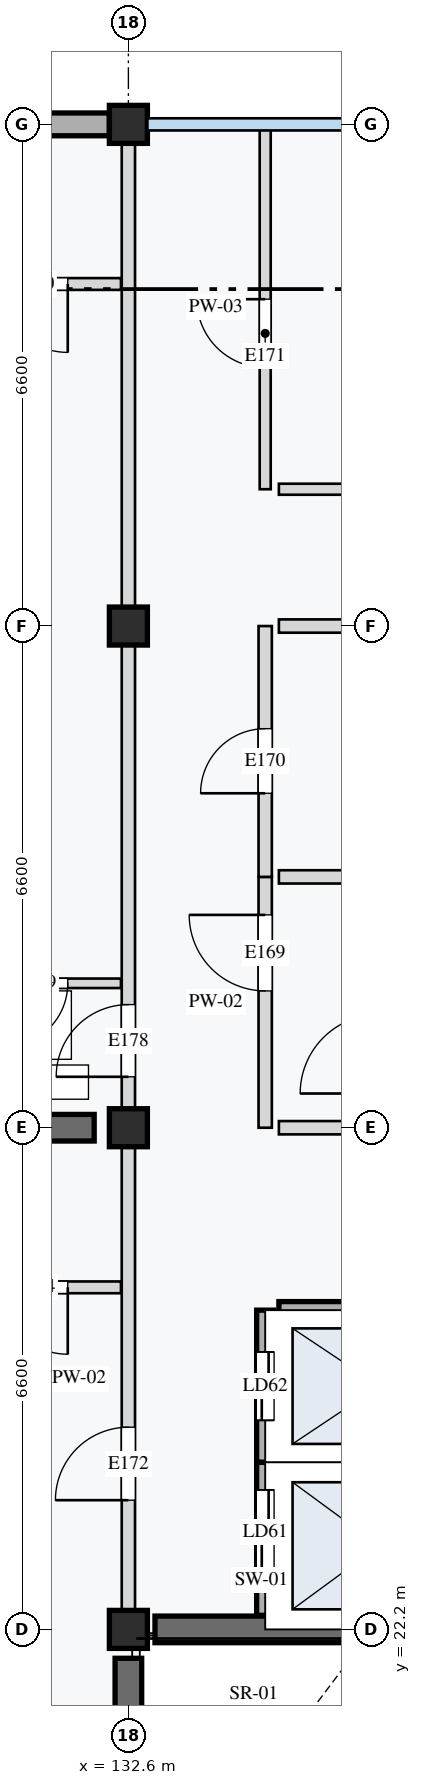
"""IFC4 building model, lengths in metres.
Left out: names, types, materials, properties, quantities, classifications, styles, units other than length and angle.
Written with IfcOpenShell. Run it as: python <this file> out.ifc"""

import sys

from ifc_helpers import new_model, si_unit, direction, frame, frame_2d, origin, origin_2d, place, context, subcontext, project, spatial, rectangle, extrude, element, fill, save


model = new_model("IFC4")
c1 = context("Model", 3, precision=1e-05, world=origin(), true_north=direction((0.0, 1.0)))
c2 = subcontext(c1, "Body", "Model", "MODEL_VIEW")
j1 = project(units=[si_unit("LENGTHUNIT", "METRE"), si_unit("PLANEANGLEUNIT", "RADIAN")], contexts=[c1])
p1 = place(None, origin())
s1 = spatial("IfcSite", under=j1, at=p1, CompositionType="ELEMENT")
p2 = place(p1, origin())
s2 = spatial("IfcBuilding", under=s1, at=p2, CompositionType="ELEMENT")
p3 = place(p2, frame((0.0, 0.0, 11.6)))
s3 = spatial("IfcBuildingStorey", under=s2, at=p3, CompositionType="ELEMENT", Elevation=11.6)
for number, where, z_axis, x_axis in (
    (1, (132.6, 22.2, 0.0), (0.0, 0.0, 1.0), (1.0, 0.0, 0.0)),
    (2, (132.6, 28.8, 0.0), (0.0, 0.0, 1.0), (1.0, 0.0, 0.0)),
    (3, (132.6, 35.4, 0.0), (0.0, 0.0, 1.0), (1.0, 0.0, 0.0)),
    (4, (132.6, 42.0, 0.0), (0.0, 0.0, 1.0), (1.0, 0.0, 0.0)),
):
    element("IfcColumn", number, at=place(p3, frame(where, z_axis=z_axis, x_axis=x_axis)), inside=s3, PredefinedType="COLUMN", context=c2, shape_type="SweptSolid", body=[
        extrude(rectangle(XDim=0.5, YDim=0.5, at=origin_2d()), origin(), (0.0, 0.0, 1.0), 3.2),
    ])
p4 = place(p3, frame((132.6, 15.98, 0.0), z_axis=(0.0, 0.0, 1.0), x_axis=(0.0, 1.0, 0.0)))
e5 = element("IfcWall", 5, at=p4, inside=s3, PredefinedType="SHEAR", context=c2, shape_type="SweptSolid", body=[
    extrude(rectangle(XDim=5.84, YDim=0.35, at=frame_2d((2.92, 0.0))), origin(), (0.0, 0.0, 1.0), 2.96),
])
p5 = place(p3, frame((132.95, 22.2, 0.0), z_axis=(0.0, 0.0, 1.0), x_axis=(1.0, 0.0, 0.0)))
e6 = element("IfcWall", 6, at=p5, inside=s3, PredefinedType="SHEAR", context=c2, shape_type="SweptSolid", body=[
    extrude(rectangle(XDim=2.8, YDim=0.35, at=frame_2d((1.4, 0.0))), origin(), (0.0, 0.0, 1.0), 2.96),
])
p6 = place(p3, frame((126.45, 28.8, 0.0), z_axis=(0.0, 0.0, 1.0), x_axis=(1.0, 0.0, 0.0)))
e7 = element("IfcWall", 7, at=p6, inside=s3, PredefinedType="SHEAR", context=c2, shape_type="SweptSolid", body=[
    extrude(rectangle(XDim=5.7, YDim=0.35, at=frame_2d((2.85, 0.0))), origin(), (0.0, 0.0, 1.0), 2.96),
])
p7 = place(p3, frame((126.25, 42.0, 0.0), z_axis=(0.0, 0.0, 1.0), x_axis=(1.0, 0.0, 0.0)))
e8 = element("IfcWall", 8, at=p7, inside=s3, PredefinedType="STANDARD", context=c2, shape_type="SweptSolid", body=[
    extrude(rectangle(XDim=6.1, YDim=0.3, at=frame_2d((3.05, 0.0))), origin(), (0.0, 0.0, 1.0), 2.65),
])
p8 = place(p3, frame((134.4, 22.385, 0.0), z_axis=(0.0, 0.0, 1.0), x_axis=(0.0, 1.0, 0.0)))
e9 = element("IfcWall", 9, at=p8, inside=s3, PredefinedType="STANDARD", context=c2, shape_type="SweptSolid", body=[
    extrude(rectangle(XDim=2.015, YDim=0.225, at=frame_2d((1.007, 0.0))), origin(), (0.0, 0.0, 1.0), 2.96),
])
p9 = place(p8, frame((0.55, 0.0, 0.0)))
e10 = element("IfcOpeningElement", 10, at=p9, cuts=e9, PredefinedType="OPENING", context=c2, shape_type="SweptSolid", body=[
    extrude(rectangle(XDim=1.1, YDim=2.1, at=frame_2d((0.55, 1.05))), frame((0.0, 0.123, 0.0), z_axis=(0.0, -1.0, 0.0), x_axis=(1.0, 0.0, 0.0)), (0.0, 0.0, 1.0), 0.245),
])
p10 = place(p3, frame((134.4, 24.4, 0.0), z_axis=(0.0, 0.0, 1.0), x_axis=(0.0, 1.0, 0.0)))
e11 = element("IfcWall", 11, at=p10, inside=s3, PredefinedType="STANDARD", context=c2, shape_type="SweptSolid", body=[
    extrude(rectangle(XDim=2.0, YDim=0.225, at=frame_2d((1.0, 0.0))), origin(), (0.0, 0.0, 1.0), 2.96),
])
p11 = place(p10, frame((0.55, 0.0, 0.0)))
e12 = element("IfcOpeningElement", 12, at=p11, cuts=e11, PredefinedType="OPENING", context=c2, shape_type="SweptSolid", body=[
    extrude(rectangle(XDim=0.9, YDim=2.1, at=frame_2d((0.45, 1.05))), frame((0.0, 0.123, 0.0), z_axis=(0.0, -1.0, 0.0), x_axis=(1.0, 0.0, 0.0)), (0.0, 0.0, 1.0), 0.245),
])
for number, where, z_axis, x_axis in (
    (13, (134.58, 24.4, 0.0), (0.0, 0.0, 1.0), (1.0, 0.0, 0.0)),
    (14, (134.58, 26.4, 0.0), (0.0, 0.0, 1.0), (1.0, 0.0, 0.0)),
):
    element("IfcWall", number, at=place(p3, frame(where, z_axis=z_axis, x_axis=x_axis)), inside=s3, PredefinedType="STANDARD", context=c2, shape_type="SweptSolid", body=[
        extrude(rectangle(XDim=2.64, YDim=0.225, at=frame_2d((1.32, 0.0))), origin(), (0.0, 0.0, 1.0), 2.96),
    ])
p12 = place(p3, frame((134.4, 28.8, 0.0), z_axis=(0.0, 0.0, 1.0), x_axis=(0.0, 1.0, 0.0)))
e15 = element("IfcWall", 15, at=p12, inside=s3, PredefinedType="PARTITIONING", context=c2, shape_type="SweptSolid", body=[
    extrude(rectangle(XDim=3.3, YDim=0.175, at=frame_2d((1.65, 0.0))), origin(), (0.0, 0.0, 1.0), 2.96),
])
p13 = place(p12, frame((1.8, 0.0, 0.0)))
e16 = element("IfcOpeningElement", 16, at=p13, cuts=e15, PredefinedType="OPENING", context=c2, shape_type="SweptSolid", body=[
    extrude(rectangle(XDim=1.0, YDim=2.1, at=frame_2d((0.5, 1.05))), frame((0.0, 0.097, 0.0), z_axis=(0.0, -1.0, 0.0), x_axis=(1.0, 0.0, 0.0)), (0.0, 0.0, 1.0), 0.195),
])
p14 = place(p3, frame((134.4, 32.1, 0.0), z_axis=(0.0, 0.0, 1.0), x_axis=(0.0, 1.0, 0.0)))
e17 = element("IfcWall", 17, at=p14, inside=s3, PredefinedType="PARTITIONING", context=c2, shape_type="SweptSolid", body=[
    extrude(rectangle(XDim=3.3, YDim=0.175, at=frame_2d((1.65, 0.0))), origin(), (0.0, 0.0, 1.0), 2.96),
])
p15 = place(p14, frame((1.1, 0.0, 0.0)))
e18 = element("IfcOpeningElement", 18, at=p15, cuts=e17, PredefinedType="OPENING", context=c2, shape_type="SweptSolid", body=[
    extrude(rectangle(XDim=0.85, YDim=2.0, at=frame_2d((0.425, 1.0))), frame((0.0, 0.097, 0.0), z_axis=(0.0, -1.0, 0.0), x_axis=(1.0, 0.0, 0.0)), (0.0, 0.0, 1.0), 0.195),
])
for number, where, z_axis, x_axis in (
    (19, (134.58, 28.8, 0.0), (0.0, 0.0, 1.0), (1.0, 0.0, 0.0)),
    (20, (134.58, 32.1, 0.0), (0.0, 0.0, 1.0), (1.0, 0.0, 0.0)),
    (21, (134.58, 35.4, 0.0), (0.0, 0.0, 1.0), (1.0, 0.0, 0.0)),
):
    element("IfcWall", number, at=place(p3, frame(where, z_axis=z_axis, x_axis=x_axis)), inside=s3, PredefinedType="PARTITIONING", context=c2, shape_type="SweptSolid", body=[
        extrude(rectangle(XDim=1.14, YDim=0.175, at=frame_2d((0.57, 0.0))), origin(), (0.0, 0.0, 1.0), 2.96),
    ])
p16 = place(p3, frame((134.4, 37.2, 0.0), z_axis=(0.0, 0.0, 1.0), x_axis=(0.0, 1.0, 0.0)))
e22 = element("IfcWall", 22, at=p16, inside=s3, PredefinedType="PARTITIONING", context=c2, shape_type="SweptSolid", body=[
    extrude(rectangle(XDim=4.8, YDim=0.145, at=frame_2d((2.4, 0.0))), origin(), (0.0, 0.0, 1.0), 2.96),
])
p17 = place(p16, frame((1.6, 0.0, 0.0)))
e23 = element("IfcOpeningElement", 23, at=p17, cuts=e22, PredefinedType="OPENING", context=c2, shape_type="SweptSolid", body=[
    extrude(rectangle(XDim=0.9, YDim=2.16, at=frame_2d((0.45, 1.08))), frame((0.0, 0.083, 0.0), z_axis=(0.0, -1.0, 0.0), x_axis=(1.0, 0.0, 0.0)), (0.0, 0.0, 1.0), 0.165),
])
p18 = place(p3, frame((134.58, 37.2, 0.0), z_axis=(0.0, 0.0, 1.0), x_axis=(1.0, 0.0, 0.0)))
e24 = element("IfcWall", 24, at=p18, inside=s3, PredefinedType="PARTITIONING", context=c2, shape_type="SweptSolid", body=[
    extrude(rectangle(XDim=2.64, YDim=0.145, at=frame_2d((1.32, 0.0))), origin(), (0.0, 0.0, 1.0), 2.96),
])
p19 = place(p3, frame((132.6, 22.2, 0.0), z_axis=(0.0, 0.0, 1.0), x_axis=(0.0, 1.0, 0.0)))
e25 = element("IfcWall", 25, at=p19, inside=s3, PredefinedType="PARTITIONING", context=c2, shape_type="SweptSolid", body=[
    extrude(rectangle(XDim=6.6, YDim=0.175, at=frame_2d((3.3, 0.0))), origin(), (0.0, 0.0, 1.0), 2.55),
])
p20 = place(p19, frame((1.7, 0.0, 0.0)))
e26 = element("IfcOpeningElement", 26, at=p20, cuts=e25, PredefinedType="OPENING", context=c2, shape_type="SweptSolid", body=[
    extrude(rectangle(XDim=0.96, YDim=2.18, at=frame_2d((0.48, 1.09))), frame((0.0, 0.097, 0.0), z_axis=(0.0, -1.0, 0.0), x_axis=(1.0, 0.0, 0.0)), (0.0, 0.0, 1.0), 0.195),
])
p21 = place(p3, frame((132.502, 26.7, 0.0), z_axis=(0.0, 0.0, 1.0), x_axis=(-1.0, 0.0, 0.0)))
e27 = element("IfcWall", 27, at=p21, inside=s3, PredefinedType="PARTITIONING", context=c2, shape_type="SweptSolid", body=[
    extrude(rectangle(XDim=2.302, YDim=0.155, at=frame_2d((1.151, 0.0))), origin(), (0.0, 0.0, 1.0), 2.96),
])
p22 = place(p21, frame((0.7, 0.0, 0.0)))
e28 = element("IfcOpeningElement", 28, at=p22, cuts=e27, PredefinedType="OPENING", context=c2, shape_type="SweptSolid", body=[
    extrude(rectangle(XDim=0.88, YDim=2.16, at=frame_2d((0.44, 1.08))), frame((0.0, 0.087, 0.0), z_axis=(0.0, -1.0, 0.0), x_axis=(1.0, 0.0, 0.0)), (0.0, 0.0, 1.0), 0.175),
])
p23 = place(p3, frame((132.6, 28.8, 0.0), z_axis=(0.0, 0.0, 1.0), x_axis=(0.0, 1.0, 0.0)))
e29 = element("IfcWall", 29, at=p23, inside=s3, PredefinedType="PARTITIONING", context=c2, shape_type="SweptSolid", body=[
    extrude(rectangle(XDim=13.2, YDim=0.175, at=frame_2d((6.6, 0.0))), origin(), (0.0, 0.0, 1.0), 2.55),
])
p24 = place(p23, frame((0.67, 0.0, 0.0)))
e30 = element("IfcOpeningElement", 30, at=p24, cuts=e29, PredefinedType="OPENING", context=c2, shape_type="SweptSolid", body=[
    extrude(rectangle(XDim=0.95, YDim=2.16, at=frame_2d((0.475, 1.08))), frame((0.0, 0.097, 0.0), z_axis=(0.0, -1.0, 0.0), x_axis=(1.0, 0.0, 0.0)), (0.0, 0.0, 1.0), 0.195),
])
p25 = place(p3, frame((132.502, 30.7, 0.0), z_axis=(0.0, 0.0, 1.0), x_axis=(-1.0, 0.0, 0.0)))
e31 = element("IfcWall", 31, at=p25, inside=s3, PredefinedType="PARTITIONING", context=c2, shape_type="SweptSolid", body=[
    extrude(rectangle(XDim=2.302, YDim=0.125, at=frame_2d((1.151, 0.0))), origin(), (0.0, 0.0, 1.0), 2.96),
])
p26 = place(p25, frame((0.7, 0.0, 0.0)))
e32 = element("IfcOpeningElement", 32, at=p26, cuts=e31, PredefinedType="OPENING", context=c2, shape_type="SweptSolid", body=[
    extrude(rectangle(XDim=0.84, YDim=2.06, at=frame_2d((0.42, 1.03))), frame((0.0, 0.073, 0.0), z_axis=(0.0, -1.0, 0.0), x_axis=(1.0, 0.0, 0.0)), (0.0, 0.0, 1.0), 0.145),
])
p27 = place(p3, frame((132.502, 39.9, 0.0), z_axis=(0.0, 0.0, 1.0), x_axis=(-1.0, 0.0, 0.0)))
e33 = element("IfcWall", 33, at=p27, inside=s3, PredefinedType="PARTITIONING", context=c2, shape_type="SweptSolid", body=[
    extrude(rectangle(XDim=2.302, YDim=0.155, at=frame_2d((1.151, 0.0))), origin(), (0.0, 0.0, 1.0), 2.96),
])
p28 = place(p27, frame((0.7, 0.0, 0.0)))
e34 = element("IfcOpeningElement", 34, at=p28, cuts=e33, PredefinedType="OPENING", context=c2, shape_type="SweptSolid", body=[
    extrude(rectangle(XDim=0.9, YDim=2.16, at=frame_2d((0.45, 1.08))), frame((0.0, 0.087, 0.0), z_axis=(0.0, -1.0, 0.0), x_axis=(1.0, 0.0, 0.0)), (0.0, 0.0, 1.0), 0.175),
])
p29 = place(p9, origin())
e35 = element("IfcDoor", 35, at=p29, inside=s3, OperationType="DOUBLE_DOOR_SLIDING", PredefinedType="DOOR", context=c2, shape_type="SweptSolid", body=[
    extrude(rectangle(XDim=1.1, YDim=2.1, at=frame_2d((0.55, 1.05))), frame((0.0, 0.025, 0.0), z_axis=(0.0, -1.0, 0.0), x_axis=(1.0, 0.0, 0.0)), (0.0, 0.0, 1.0), 0.05),
])
fill(e10, e35)
p30 = place(p11, origin())
e36 = element("IfcDoor", 36, at=p30, inside=s3, OperationType="DOUBLE_DOOR_SLIDING", PredefinedType="DOOR", context=c2, shape_type="SweptSolid", body=[
    extrude(rectangle(XDim=0.9, YDim=2.1, at=frame_2d((0.45, 1.05))), frame((0.0, 0.025, 0.0), z_axis=(0.0, -1.0, 0.0), x_axis=(1.0, 0.0, 0.0)), (0.0, 0.0, 1.0), 0.05),
])
fill(e12, e36)
p31 = place(p13, origin())
e37 = element("IfcDoor", 37, at=p31, inside=s3, OperationType="SINGLE_SWING_RIGHT", PredefinedType="DOOR", context=c2, shape_type="SweptSolid", body=[
    extrude(rectangle(XDim=1.0, YDim=2.1, at=frame_2d((0.5, 1.05))), frame((0.0, 0.025, 0.0), z_axis=(0.0, -1.0, 0.0), x_axis=(1.0, 0.0, 0.0)), (0.0, 0.0, 1.0), 0.05),
])
fill(e16, e37)
p32 = place(p15, origin())
e38 = element("IfcDoor", 38, at=p32, inside=s3, OperationType="SINGLE_SWING_LEFT", PredefinedType="DOOR", context=c2, shape_type="SweptSolid", body=[
    extrude(rectangle(XDim=0.85, YDim=2.0, at=frame_2d((0.425, 1.0))), frame((0.0, 0.025, 0.0), z_axis=(0.0, -1.0, 0.0), x_axis=(1.0, 0.0, 0.0)), (0.0, 0.0, 1.0), 0.05),
])
fill(e18, e38)
p33 = place(p17, origin())
e39 = element("IfcDoor", 39, at=p33, inside=s3, OperationType="SINGLE_SWING_RIGHT", PredefinedType="DOOR", context=c2, shape_type="SweptSolid", body=[
    extrude(rectangle(XDim=0.9, YDim=2.16, at=frame_2d((0.45, 1.08))), frame((0.0, 0.025, 0.0), z_axis=(0.0, -1.0, 0.0), x_axis=(1.0, 0.0, 0.0)), (0.0, 0.0, 1.0), 0.05),
])
fill(e23, e39)
p34 = place(p20, origin())
e40 = element("IfcDoor", 40, at=p34, inside=s3, OperationType="SINGLE_SWING_LEFT", PredefinedType="DOOR", context=c2, shape_type="SweptSolid", body=[
    extrude(rectangle(XDim=0.96, YDim=2.18, at=frame_2d((0.48, 1.09))), frame((0.0, 0.025, 0.0), z_axis=(0.0, -1.0, 0.0), x_axis=(1.0, 0.0, 0.0)), (0.0, 0.0, 1.0), 0.05),
])
fill(e26, e40)
p35 = place(p22, origin())
e41 = element("IfcDoor", 41, at=p35, inside=s3, OperationType="SINGLE_SWING_LEFT", PredefinedType="DOOR", context=c2, shape_type="SweptSolid", body=[
    extrude(rectangle(XDim=0.88, YDim=2.16, at=frame_2d((0.44, 1.08))), frame((0.0, 0.025, 0.0), z_axis=(0.0, -1.0, 0.0), x_axis=(1.0, 0.0, 0.0)), (0.0, 0.0, 1.0), 0.05),
])
fill(e28, e41)
p36 = place(p24, origin())
e42 = element("IfcDoor", 42, at=p36, inside=s3, OperationType="SINGLE_SWING_LEFT", PredefinedType="DOOR", context=c2, shape_type="SweptSolid", body=[
    extrude(rectangle(XDim=0.95, YDim=2.16, at=frame_2d((0.475, 1.08))), frame((0.0, 0.025, 0.0), z_axis=(0.0, -1.0, 0.0), x_axis=(1.0, 0.0, 0.0)), (0.0, 0.0, 1.0), 0.05),
])
fill(e30, e42)
p37 = place(p26, origin())
e43 = element("IfcDoor", 43, at=p37, inside=s3, OperationType="SINGLE_SWING_RIGHT", PredefinedType="DOOR", context=c2, shape_type="SweptSolid", body=[
    extrude(rectangle(XDim=0.84, YDim=2.06, at=frame_2d((0.42, 1.03))), frame((0.0, 0.025, 0.0), z_axis=(0.0, -1.0, 0.0), x_axis=(1.0, 0.0, 0.0)), (0.0, 0.0, 1.0), 0.05),
])
fill(e32, e43)
p38 = place(p28, origin())
e44 = element("IfcDoor", 44, at=p38, inside=s3, OperationType="SINGLE_SWING_LEFT", PredefinedType="DOOR", context=c2, shape_type="SweptSolid", body=[
    extrude(rectangle(XDim=0.9, YDim=2.16, at=frame_2d((0.45, 1.08))), frame((0.0, 0.025, 0.0), z_axis=(0.0, -1.0, 0.0), x_axis=(1.0, 0.0, 0.0)), (0.0, 0.0, 1.0), 0.05),
])
fill(e34, e44)
save(model, sys.argv[1])
